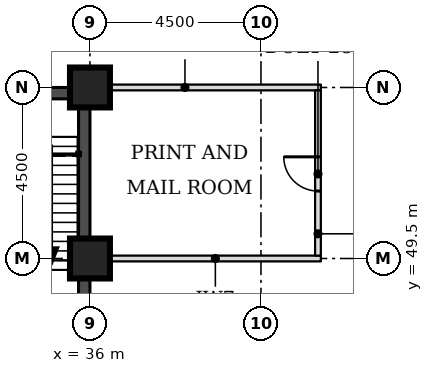
"""IFC4 building model, lengths in metres.
Left out: names, types, materials, properties, quantities, classifications, styles, units other than length and angle.
Written with IfcOpenShell. Run it as: python <this file> out.ifc"""

import sys

from ifc_helpers import new_model, si_unit, direction, frame, frame_2d, origin, origin_2d, place, context, subcontext, project, spatial, rectangle, extrude, element, fill, save


model = new_model("IFC4")
c1 = context("Model", 3, precision=1e-05, world=origin(), true_north=direction((0.0, 1.0)))
c2 = subcontext(c1, "Body", "Model", "MODEL_VIEW")
j1 = project(units=[si_unit("LENGTHUNIT", "METRE"), si_unit("PLANEANGLEUNIT", "RADIAN")], contexts=[c1])
p1 = place(None, origin())
s1 = spatial("IfcSite", under=j1, at=p1, CompositionType="ELEMENT")
p2 = place(p1, origin())
s2 = spatial("IfcBuilding", under=s1, at=p2, CompositionType="ELEMENT")
p3 = place(p2, frame((0.0, 0.0, 82.6)))
s3 = spatial("IfcBuildingStorey", under=s2, at=p3, CompositionType="ELEMENT", Elevation=82.6)
for number, where, z_axis, x_axis in (
    (1, (36.0, 49.5, 0.0), (0.0, 0.0, 1.0), (1.0, 0.0, 0.0)),
    (2, (36.0, 54.0, 0.0), (0.0, 0.0, 1.0), (1.0, 0.0, 0.0)),
):
    element("IfcColumn", number, at=place(p3, frame(where, z_axis=z_axis, x_axis=x_axis)), inside=s3, PredefinedType="COLUMN", context=c2, shape_type="SweptSolid", body=[
        extrude(rectangle(XDim=1.05, YDim=1.05, at=origin_2d()), origin(), (0.0, 0.0, 1.0), 3.7),
    ])
p4 = place(p3, frame((27.3, 53.85, 0.0), z_axis=(0.0, 0.0, 1.0), x_axis=(1.0, 0.0, 0.0)))
e3 = element("IfcWall", 3, at=p4, inside=s3, PredefinedType="SHEAR", context=c2, shape_type="SweptSolid", body=[
    extrude(rectangle(XDim=8.4, YDim=0.3, at=frame_2d((4.2, 0.0))), origin(), (0.0, 0.0, 1.0), 3.7),
])
p5 = place(p4, frame((6.4, 0.0, 0.0)))
e4 = element("IfcOpeningElement", 4, at=p5, cuts=e3, PredefinedType="OPENING", context=c2, shape_type="SweptSolid", body=[
    extrude(rectangle(XDim=1.1, YDim=2.1, at=frame_2d((0.55, 1.05))), frame((0.0, 0.16, 0.0), z_axis=(0.0, -1.0, 0.0), x_axis=(1.0, 0.0, 0.0)), (0.0, 0.0, 1.0), 0.32),
])
p6 = place(p3, frame((35.85, 45.0, 0.0), z_axis=(0.0, 0.0, 1.0), x_axis=(0.0, 1.0, 0.0)))
e5 = element("IfcWall", 5, at=p6, inside=s3, PredefinedType="SHEAR", context=c2, shape_type="SweptSolid", body=[
    extrude(rectangle(XDim=9.0, YDim=0.3, at=frame_2d((4.5, 0.0))), origin(), (0.0, 0.0, 1.0), 3.7),
])
for number, where, z_axis, x_axis in (
    (6, (36.525, 49.5, 0.0), (0.0, 0.0, 1.0), (1.0, 0.0, 0.0)),
    (7, (36.525, 54.0, 0.0), (0.0, 0.0, 1.0), (1.0, 0.0, 0.0)),
):
    element("IfcWall", number, at=place(p3, frame(where, z_axis=z_axis, x_axis=x_axis)), inside=s3, PredefinedType="PARTITIONING", context=c2, shape_type="SweptSolid", body=[
        extrude(rectangle(XDim=5.55, YDim=0.15, at=frame_2d((2.775, 0.0))), origin(), (0.0, 0.0, 1.0), 3.55),
    ])
p7 = place(p3, frame((42.0, 49.575, 0.0), z_axis=(0.0, 0.0, 1.0), x_axis=(0.0, 1.0, 0.0)))
e8 = element("IfcWall", 8, at=p7, inside=s3, PredefinedType="PARTITIONING", context=c2, shape_type="SweptSolid", body=[
    extrude(rectangle(XDim=4.35, YDim=0.15, at=frame_2d((2.175, 0.0))), origin(), (0.0, 0.0, 1.0), 3.55),
])
p8 = place(p7, frame((1.7, 0.0, 0.0)))
e9 = element("IfcOpeningElement", 9, at=p8, cuts=e8, PredefinedType="OPENING", context=c2, shape_type="SweptSolid", body=[
    extrude(rectangle(XDim=0.9, YDim=2.1, at=frame_2d((0.45, 1.05))), frame((0.0, 0.085, 0.0), z_axis=(0.0, -1.0, 0.0), x_axis=(1.0, 0.0, 0.0)), (0.0, 0.0, 1.0), 0.17),
])
p9 = place(p8, origin())
e10 = element("IfcDoor", 10, at=p9, inside=s3, OperationType="SINGLE_SWING_RIGHT", PredefinedType="DOOR", context=c2, shape_type="SweptSolid", body=[
    extrude(rectangle(XDim=0.9, YDim=2.1, at=frame_2d((0.45, 1.05))), frame((0.0, 0.025, 0.0), z_axis=(0.0, -1.0, 0.0), x_axis=(1.0, 0.0, 0.0)), (0.0, 0.0, 1.0), 0.05),
])
fill(e9, e10)
save(model, sys.argv[1])
